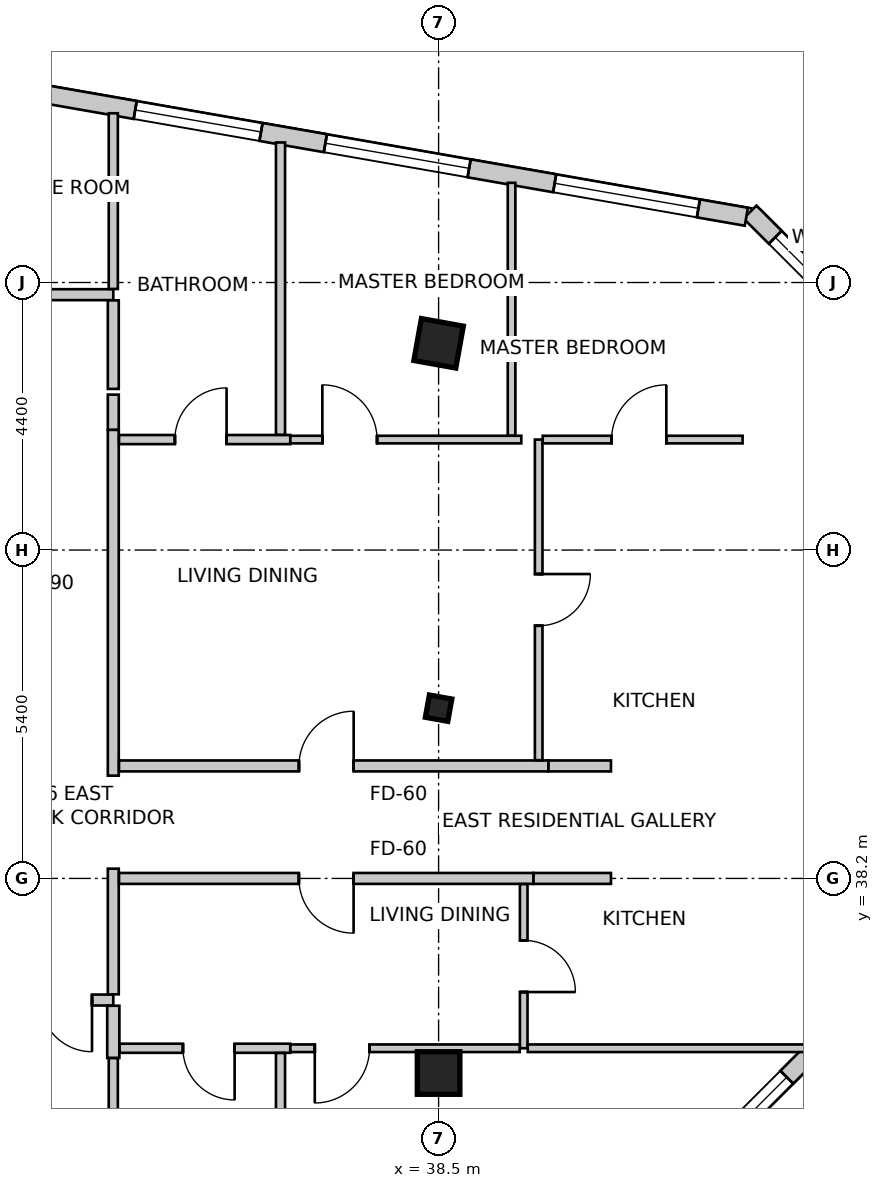
"""IFC4 building model, lengths in metres.
Left out: names, types, materials, properties, quantities, classifications, styles, units other than length and angle.
Written with IfcOpenShell. Run it as: python <this file> out.ifc"""

import sys

from ifc_helpers import new_model, si_unit, direction, frame, frame_2d, origin, origin_2d, place, context, subcontext, project, spatial, rectangle, i_section, extrude, source, transform, mapped, element, fill, save


model = new_model("IFC4")
c1 = context("Model", 3, precision=1e-05, world=origin(), true_north=direction((0.0, 1.0)))
c2 = subcontext(c1, "Body", "Model", "MODEL_VIEW")
j1 = project(units=[si_unit("LENGTHUNIT", "METRE"), si_unit("PLANEANGLEUNIT", "RADIAN")], contexts=[c1])
p1 = place(None, origin())
s1 = spatial("IfcSite", under=j1, at=p1, CompositionType="ELEMENT")
p2 = place(p1, origin())
s2 = spatial("IfcBuilding", under=s1, at=p2, CompositionType="ELEMENT")
p3 = place(p2, frame((0.0, 0.0, 221.9)))
s3 = spatial("IfcBuildingStorey", under=s2, at=p3, CompositionType="ELEMENT", Elevation=221.9)
m1 = source(origin(), c2, "Body", "SweptSolid", [
    extrude(rectangle(XDim=0.7, YDim=0.7, at=origin_2d()), origin(), (0.0, 0.0, 1.0), 3.5),
])
for number, where, z_axis, x_axis in (
    (1, (38.5, 47.0, 0.0), (0.0, 0.0, 1.0), (0.984, -0.177, 0.0)),
    (2, (38.5, 35.0, 0.0), (0.0, 0.0, 1.0), (1.0, 0.0, 0.0)),
):
    element("IfcColumn", number, at=place(p3, frame(where, z_axis=z_axis, x_axis=x_axis)), inside=s3, PredefinedType="COLUMN", context=c2, shape_type="MappedRepresentation", body=[
        mapped(m1, transform((0.0, 0.0, 0.0), scale=1.0)),
    ])
m2 = source(origin(), c2, "Body", "SweptSolid", [
    extrude(i_section(OverallWidth=0.374, OverallDepth=0.372, WebThickness=0.016, FlangeThickness=0.026, FilletRadius=0.015, at=origin_2d()), origin(), (0.0, 0.0, 1.0), 3.5),
])
p4 = place(p3, frame((38.5, 41.0, 0.0), z_axis=(0.0, 0.0, 1.0), x_axis=(0.984195607969, -0.17708474032, 0.0)))
e3 = element("IfcColumn", 3, at=p4, inside=s3, PredefinedType="COLUMN", context=c2, shape_type="MappedRepresentation", body=[
    mapped(m2, transform((0.0, 0.0, 0.0), scale=1.0)),
])
p5 = place(p3, frame((42.276, 32.98, 0.0), z_axis=(0.0, 0.0, 1.0), x_axis=(0.707106781187, 0.707106781187, 0.0)))
e4 = element("IfcWall", 4, at=p5, inside=s3, PredefinedType="SOLIDWALL", context=c2, shape_type="SweptSolid", body=[
    extrude(rectangle(XDim=4.922, YDim=0.3, at=frame_2d((2.461, 0.0))), origin(), (0.0, 0.0, 1.0), 3.25),
])
m3 = source(origin(), c2, "Body", "SweptSolid", [
    extrude(rectangle(XDim=2.1, YDim=2.0, at=frame_2d((1.05, 1.0))), frame((0.0, 0.16, 0.0), z_axis=(0.0, -1.0, 0.0), x_axis=(1.0, 0.0, 0.0)), (0.0, 0.0, 1.0), 0.32),
])
p6 = place(p5, frame((0.659, 0.0, 0.85)))
e5 = element("IfcOpeningElement", 5, at=p6, cuts=e4, PredefinedType="OPENING", context=c2, shape_type="MappedRepresentation", body=[
    mapped(m3, transform((0.0, 0.0, 0.0), scale=1.0)),
])
p7 = place(p3, frame((45.512, 47.268, 0.0), z_axis=(0.0, 0.0, 1.0), x_axis=(-0.707106781187, 0.707106781187, 0.0)))
e6 = element("IfcWall", 6, at=p7, inside=s3, PredefinedType="SOLIDWALL", context=c2, shape_type="SweptSolid", body=[
    extrude(rectangle(XDim=2.674, YDim=0.3, at=frame_2d((1.337, 0.0))), origin(), (0.0, 0.0, 1.0), 3.25),
])
m4 = source(origin(), c2, "Body", "SweptSolid", [
    extrude(rectangle(XDim=1.5, YDim=1.8, at=frame_2d((0.75, 0.9))), frame((0.0, 0.16, 0.0), z_axis=(0.0, -1.0, 0.0), x_axis=(1.0, 0.0, 0.0)), (0.0, 0.0, 1.0), 0.32),
])
p8 = place(p7, frame((0.587, 0.0, 0.85)))
e7 = element("IfcOpeningElement", 7, at=p8, cuts=e6, PredefinedType="OPENING", context=c2, shape_type="MappedRepresentation", body=[
    mapped(m4, transform((0.0, 0.0, 0.0), scale=1.0)),
])
p9 = place(p3, frame((43.561, 49.081, 0.0), z_axis=(0.0, 0.0, 1.0), x_axis=(-0.985083967494, 0.17207433564, 0.0)))
e8 = element("IfcWall", 8, at=p9, inside=s3, PredefinedType="SOLIDWALL", context=c2, shape_type="SweptSolid", body=[
    extrude(rectangle(XDim=22.006, YDim=0.3, at=frame_2d((11.003, 0.0))), origin(), (0.0, 0.0, 1.0), 3.25),
])
m5 = source(origin(), c2, "Body", "SweptSolid", [
    extrude(rectangle(XDim=2.4, YDim=2.2, at=frame_2d((1.2, 1.1))), frame((0.0, 0.16, 0.0), z_axis=(0.0, -1.0, 0.0), x_axis=(1.0, 0.0, 0.0)), (0.0, 0.0, 1.0), 0.32),
])
p10 = place(p9, frame((0.8, 0.0, 0.85)))
e9 = element("IfcOpeningElement", 9, at=p10, cuts=e8, PredefinedType="OPENING", context=c2, shape_type="MappedRepresentation", body=[
    mapped(m5, transform((0.0, 0.0, 0.0), scale=1.0)),
])
p11 = place(p9, frame((4.628, 0.0, 0.85)))
e10 = element("IfcOpeningElement", 10, at=p11, cuts=e8, PredefinedType="OPENING", context=c2, shape_type="MappedRepresentation", body=[
    mapped(m5, transform((0.0, 0.0, 0.0), scale=1.0)),
])
p12 = place(p9, frame((8.103, 0.0, 0.85)))
e11 = element("IfcOpeningElement", 11, at=p12, cuts=e8, PredefinedType="OPENING", context=c2, shape_type="MappedRepresentation", body=[
    mapped(m3, transform((0.0, 0.0, 0.0), scale=1.0)),
])
p13 = place(p9, frame((11.963, 0.0, 0.85)))
e12 = element("IfcOpeningElement", 12, at=p13, cuts=e8, PredefinedType="OPENING", context=c2, shape_type="MappedRepresentation", body=[
    mapped(m5, transform((0.0, 0.0, 0.0), scale=1.0)),
])
p14 = place(p9, frame((16.047, 0.0, 0.85)))
e13 = element("IfcOpeningElement", 13, at=p14, cuts=e8, PredefinedType="OPENING", context=c2, shape_type="MappedRepresentation", body=[
    mapped(m3, transform((0.0, 0.0, 0.0), scale=1.0)),
])
p15 = place(p9, frame((18.961, 0.0, 0.85)))
e14 = element("IfcOpeningElement", 14, at=p15, cuts=e8, PredefinedType="OPENING", context=c2, shape_type="MappedRepresentation", body=[
    mapped(m5, transform((0.0, 0.0, 0.0), scale=1.0)),
])
p16 = place(p3, frame((28.162, 47.8, 0.0), z_axis=(0.0, 0.0, 1.0), x_axis=(1.0, 0.0, 0.0)))
e15 = element("IfcWall", 15, at=p16, inside=s3, PredefinedType="PARTITIONING", context=c2, shape_type="SweptSolid", body=[
    extrude(rectangle(XDim=4.988, YDim=0.18, at=frame_2d((2.494, 0.0))), origin(), (0.0, 0.0, 1.0), 2.822),
])
m6 = source(origin(), c2, "Body", "SweptSolid", [
    extrude(rectangle(XDim=0.85, YDim=2.15, at=frame_2d((0.425, 1.075))), frame((0.0, 0.1, 0.0), z_axis=(0.0, -1.0, 0.0), x_axis=(1.0, 0.0, 0.0)), (0.0, 0.0, 1.0), 0.2),
])
p17 = place(p16, frame((0.403, 0.0, 0.0)))
e16 = element("IfcOpeningElement", 16, at=p17, cuts=e15, PredefinedType="OPENING", context=c2, shape_type="MappedRepresentation", body=[
    mapped(m6, transform((0.0, 0.0, 0.0), scale=1.0)),
])
p18 = place(p3, frame((33.15, 47.706, 0.0), z_axis=(0.0, 0.0, 1.0), x_axis=(0.0, -1.0, 0.0)))
e17 = element("IfcWall", 17, at=p18, inside=s3, PredefinedType="PARTITIONING", context=c2, shape_type="SweptSolid", body=[
    extrude(rectangle(XDim=1.456, YDim=0.18, at=frame_2d((0.728, 0.0))), origin(), (0.0, 0.0, 1.0), 2.934),
])
p19 = place(p3, frame((33.15, 36.2, 0.0), z_axis=(0.0, 0.0, 1.0), x_axis=(-1.0, 0.0, 0.0)))
e18 = element("IfcWall", 18, at=p19, inside=s3, PredefinedType="PARTITIONING", context=c2, shape_type="SweptSolid", body=[
    extrude(rectangle(XDim=1.48, YDim=0.18, at=frame_2d((0.74, 0.0))), origin(), (0.0, 0.0, 1.0), 3.25),
])
p20 = place(p19, frame((0.35, 0.0, 0.0)))
e19 = element("IfcOpeningElement", 19, at=p20, cuts=e18, PredefinedType="OPENING", context=c2, shape_type="MappedRepresentation", body=[
    mapped(m6, transform((0.0, 0.0, 0.0), scale=1.0)),
])
p21 = place(p3, frame((33.15, 45.577, 0.0), z_axis=(0.0, 0.0, 1.0), x_axis=(0.0, -1.0, 0.0)))
e20 = element("IfcWall", 20, at=p21, inside=s3, PredefinedType="PARTITIONING", context=c2, shape_type="SweptSolid", body=[
    extrude(rectangle(XDim=5.687, YDim=0.18, at=frame_2d((2.844, 0.0))), origin(), (0.0, 0.0, 1.0), 2.822),
])
p22 = place(p3, frame((33.15, 46.156, 0.0), z_axis=(0.0, 0.0, 1.0), x_axis=(0.0, -1.0, 0.0)))
e21 = element("IfcWall", 21, at=p22, inside=s3, PredefinedType="PARTITIONING", context=c2, shape_type="SweptSolid", body=[
    extrude(rectangle(XDim=0.577, YDim=0.18, at=frame_2d((0.289, 0.0))), origin(), (0.0, 0.0, 1.0), 2.822),
])
p23 = place(p3, frame((33.15, 38.36, 0.0), z_axis=(0.0, 0.0, 1.0), x_axis=(0.0, -1.0, 0.0)))
e22 = element("IfcWall", 22, at=p23, inside=s3, PredefinedType="PARTITIONING", context=c2, shape_type="SweptSolid", body=[
    extrude(rectangle(XDim=2.066, YDim=0.18, at=frame_2d((1.033, 0.0))), origin(), (0.0, 0.0, 1.0), 3.25),
])
p24 = place(p3, frame((33.15, 50.783, 0.0), z_axis=(0.0, 0.0, 1.0), x_axis=(0.0, -1.0, 0.0)))
e23 = element("IfcWall", 23, at=p24, inside=s3, PredefinedType="PARTITIONING", context=c2, shape_type="SweptSolid", body=[
    extrude(rectangle(XDim=2.889, YDim=0.15, at=frame_2d((1.445, 0.0))), origin(), (0.0, 0.0, 1.0), 2.542),
])
p25 = place(p3, frame((33.244, 40.05, 0.0), z_axis=(0.0, 0.0, 1.0), x_axis=(1.0, 0.0, 0.0)))
e24 = element("IfcWall", 24, at=p25, inside=s3, PredefinedType="PARTITIONING", context=c2, shape_type="SweptSolid", body=[
    extrude(rectangle(XDim=7.062, YDim=0.18, at=frame_2d((3.531, 0.0))), origin(), (0.0, 0.0, 1.0), 2.766),
])
m7 = source(origin(), c2, "Body", "SweptSolid", [
    extrude(rectangle(XDim=0.9, YDim=2.15, at=frame_2d((0.45, 1.075))), frame((0.0, 0.1, 0.0), z_axis=(0.0, -1.0, 0.0), x_axis=(1.0, 0.0, 0.0)), (0.0, 0.0, 1.0), 0.2),
])
p26 = place(p25, frame((2.959, 0.0, 0.0)))
e25 = element("IfcOpeningElement", 25, at=p26, cuts=e24, PredefinedType="OPENING", context=c2, shape_type="MappedRepresentation", body=[
    mapped(m7, transform((0.0, 0.0, 0.0), scale=1.0)),
])
p27 = place(p3, frame((40.308, 40.05, 0.0), z_axis=(0.0, 0.0, 1.0), x_axis=(1.0, 0.0, 0.0)))
e26 = element("IfcWall", 26, at=p27, inside=s3, PredefinedType="PARTITIONING", context=c2, shape_type="SweptSolid", body=[
    extrude(rectangle(XDim=1.027, YDim=0.18, at=frame_2d((0.513, 0.0))), origin(), (0.0, 0.0, 1.0), 3.25),
])
p28 = place(p3, frame((40.06, 38.2, 0.0), z_axis=(0.0, 0.0, 1.0), x_axis=(-1.0, 0.0, 0.0)))
e27 = element("IfcWall", 27, at=p28, inside=s3, PredefinedType="PARTITIONING", context=c2, shape_type="SweptSolid", body=[
    extrude(rectangle(XDim=6.816, YDim=0.18, at=frame_2d((3.408, 0.0))), origin(), (0.0, 0.0, 1.0), 2.766),
])
p29 = place(p28, frame((2.958, 0.0, 0.0)))
e28 = element("IfcOpeningElement", 28, at=p29, cuts=e27, PredefinedType="OPENING", context=c2, shape_type="MappedRepresentation", body=[
    mapped(m7, transform((0.0, 0.0, 0.0), scale=1.0)),
])
p30 = place(p3, frame((41.335, 38.2, 0.0), z_axis=(0.0, 0.0, 1.0), x_axis=(-1.0, 0.0, 0.0)))
e29 = element("IfcWall", 29, at=p30, inside=s3, PredefinedType="PARTITIONING", context=c2, shape_type="SweptSolid", body=[
    extrude(rectangle(XDim=1.273, YDim=0.18, at=frame_2d((0.636, 0.0))), origin(), (0.0, 0.0, 1.0), 3.25),
])
p31 = place(p3, frame((33.15, 36.106, 0.0), z_axis=(0.0, 0.0, 1.0), x_axis=(0.0, -1.0, 0.0)))
e30 = element("IfcWall", 30, at=p31, inside=s3, PredefinedType="PARTITIONING", context=c2, shape_type="SweptSolid", body=[
    extrude(rectangle(XDim=0.859, YDim=0.2, at=frame_2d((0.429, 0.0))), origin(), (0.0, 0.0, 1.0), 3.25),
])
p32 = place(p3, frame((33.15, 35.245, 0.0), z_axis=(0.0, 0.0, 1.0), x_axis=(0.0, -1.0, 0.0)))
e31 = element("IfcWall", 31, at=p32, inside=s3, PredefinedType="PARTITIONING", context=c2, shape_type="SweptSolid", body=[
    extrude(rectangle(XDim=2.288, YDim=0.15, at=frame_2d((1.144, 0.0))), origin(), (0.0, 0.0, 1.0), 3.25),
])
p33 = place(p3, frame((40.146, 45.417, 0.0), z_axis=(0.0, 0.0, 1.0), x_axis=(0.0, -1.0, 0.0)))
e32 = element("IfcWall", 32, at=p33, inside=s3, PredefinedType="PARTITIONING", context=c2, shape_type="SweptSolid", body=[
    extrude(rectangle(XDim=5.273, YDim=0.125, at=frame_2d((2.636, 0.0))), origin(), (0.0, 0.0, 1.0), 3.25),
])
m8 = source(origin(), c2, "Body", "SweptSolid", [
    extrude(rectangle(XDim=0.85, YDim=2.15, at=frame_2d((0.425, 1.075))), frame((0.0, 0.073, 0.0), z_axis=(0.0, -1.0, 0.0), x_axis=(1.0, 0.0, 0.0)), (0.0, 0.0, 1.0), 0.145),
])
p34 = place(p33, frame((2.211, 0.0, 0.0)))
e33 = element("IfcOpeningElement", 33, at=p34, cuts=e32, PredefinedType="OPENING", context=c2, shape_type="MappedRepresentation", body=[
    mapped(m8, transform((0.0, 0.0, 0.0), scale=1.0)),
])
p35 = place(p3, frame((33.244, 45.417, 0.0), z_axis=(0.0, 0.0, 1.0), x_axis=(1.0, 0.0, 0.0)))
e34 = element("IfcWall", 34, at=p35, inside=s3, PredefinedType="PARTITIONING", context=c2, shape_type="SweptSolid", body=[
    extrude(rectangle(XDim=2.816, YDim=0.15, at=frame_2d((1.408, 0.0))), origin(), (0.0, 0.0, 1.0), 2.934),
])
m9 = source(origin(), c2, "Body", "SweptSolid", [
    extrude(rectangle(XDim=0.85, YDim=2.15, at=frame_2d((0.425, 1.075))), frame((0.0, 0.085, 0.0), z_axis=(0.0, -1.0, 0.0), x_axis=(1.0, 0.0, 0.0)), (0.0, 0.0, 1.0), 0.17),
])
p36 = place(p35, frame((0.919, 0.0, 0.0)))
e35 = element("IfcOpeningElement", 35, at=p36, cuts=e34, PredefinedType="OPENING", context=c2, shape_type="MappedRepresentation", body=[
    mapped(m9, transform((0.0, 0.0, 0.0), scale=1.0)),
])
p37 = place(p3, frame((36.062, 45.417, 0.0), z_axis=(0.0, 0.0, 1.0), x_axis=(1.0, 0.0, 0.0)))
e36 = element("IfcWall", 36, at=p37, inside=s3, PredefinedType="PARTITIONING", context=c2, shape_type="SweptSolid", body=[
    extrude(rectangle(XDim=3.798, YDim=0.125, at=frame_2d((1.899, 0.0))), origin(), (0.0, 0.0, 1.0), 2.766),
])
m10 = source(origin(), c2, "Body", "SweptSolid", [
    extrude(rectangle(XDim=0.9, YDim=2.15, at=frame_2d((0.45, 1.075))), frame((0.0, 0.073, 0.0), z_axis=(0.0, -1.0, 0.0), x_axis=(1.0, 0.0, 0.0)), (0.0, 0.0, 1.0), 0.145),
])
p38 = place(p37, frame((0.526, 0.0, 0.0)))
e37 = element("IfcOpeningElement", 37, at=p38, cuts=e36, PredefinedType="OPENING", context=c2, shape_type="MappedRepresentation", body=[
    mapped(m10, transform((0.0, 0.0, 0.0), scale=1.0)),
])
p39 = place(p3, frame((40.212, 45.417, 0.0), z_axis=(0.0, 0.0, 1.0), x_axis=(1.0, 0.0, 0.0)))
e38 = element("IfcWall", 38, at=p39, inside=s3, PredefinedType="PARTITIONING", context=c2, shape_type="SweptSolid", body=[
    extrude(rectangle(XDim=3.288, YDim=0.125, at=frame_2d((1.644, 0.0))), origin(), (0.0, 0.0, 1.0), 3.25),
])
p40 = place(p39, frame((1.133, 0.0, 0.0)))
e39 = element("IfcOpeningElement", 39, at=p40, cuts=e38, PredefinedType="OPENING", context=c2, shape_type="MappedRepresentation", body=[
    mapped(m10, transform((0.0, 0.0, 0.0), scale=1.0)),
])
p41 = place(p3, frame((35.9, 50.303, 0.0), z_axis=(0.0, 0.0, 1.0), x_axis=(0.0, -1.0, 0.0)))
e40 = element("IfcWall", 40, at=p41, inside=s3, PredefinedType="PARTITIONING", context=c2, shape_type="SweptSolid", body=[
    extrude(rectangle(XDim=4.807, YDim=0.15, at=frame_2d((2.403, 0.0))), origin(), (0.0, 0.0, 1.0), 2.542),
])
p42 = place(p3, frame((39.7, 49.639, 0.0), z_axis=(0.0, 0.0, 1.0), x_axis=(0.0, -1.0, 0.0)))
e41 = element("IfcWall", 41, at=p42, inside=s3, PredefinedType="PARTITIONING", context=c2, shape_type="SweptSolid", body=[
    extrude(rectangle(XDim=4.156, YDim=0.125, at=frame_2d((2.078, 0.0))), origin(), (0.0, 0.0, 1.0), 3.25),
])
p43 = place(p3, frame((39.9, 38.106, 0.0), z_axis=(0.0, 0.0, 1.0), x_axis=(0.0, -1.0, 0.0)))
e42 = element("IfcWall", 42, at=p43, inside=s3, PredefinedType="PARTITIONING", context=c2, shape_type="SweptSolid", body=[
    extrude(rectangle(XDim=2.699, YDim=0.125, at=frame_2d((1.35, 0.0))), origin(), (0.0, 0.0, 1.0), 3.25),
])
p44 = place(p43, frame((0.925, 0.0, 0.0)))
e43 = element("IfcOpeningElement", 43, at=p44, cuts=e42, PredefinedType="OPENING", context=c2, shape_type="MappedRepresentation", body=[
    mapped(m8, transform((0.0, 0.0, 0.0), scale=1.0)),
])
p45 = place(p3, frame((36.06, 35.407, 0.0), z_axis=(0.0, 0.0, 1.0), x_axis=(-1.0, 0.0, 0.0)))
e44 = element("IfcWall", 44, at=p45, inside=s3, PredefinedType="PARTITIONING", context=c2, shape_type="SweptSolid", body=[
    extrude(rectangle(XDim=2.806, YDim=0.15, at=frame_2d((1.403, 0.0))), origin(), (0.0, 0.0, 1.0), 3.25),
])
p46 = place(p45, frame((0.915, 0.0, 0.0)))
e45 = element("IfcOpeningElement", 45, at=p46, cuts=e44, PredefinedType="OPENING", context=c2, shape_type="MappedRepresentation", body=[
    mapped(m9, transform((0.0, 0.0, 0.0), scale=1.0)),
])
p47 = place(p3, frame((39.833, 35.407, 0.0), z_axis=(0.0, 0.0, 1.0), x_axis=(-1.0, 0.0, 0.0)))
e46 = element("IfcWall", 46, at=p47, inside=s3, PredefinedType="PARTITIONING", context=c2, shape_type="SweptSolid", body=[
    extrude(rectangle(XDim=3.771, YDim=0.125, at=frame_2d((1.886, 0.0))), origin(), (0.0, 0.0, 1.0), 2.766),
])
p48 = place(p47, frame((2.47, 0.0, 0.0)))
e47 = element("IfcOpeningElement", 47, at=p48, cuts=e46, PredefinedType="OPENING", context=c2, shape_type="MappedRepresentation", body=[
    mapped(m10, transform((0.0, 0.0, 0.0), scale=1.0)),
])
p49 = place(p3, frame((44.54, 35.407, 0.0), z_axis=(0.0, 0.0, 1.0), x_axis=(-1.0, 0.0, 0.0)))
e48 = element("IfcWall", 48, at=p49, inside=s3, PredefinedType="PARTITIONING", context=c2, shape_type="SweptSolid", body=[
    extrude(rectangle(XDim=4.574, YDim=0.125, at=frame_2d((2.287, 0.0))), origin(), (0.0, 0.0, 1.0), 3.25),
])
p50 = place(p3, frame((35.9, 35.328, 0.0), z_axis=(0.0, 0.0, 1.0), x_axis=(0.0, -1.0, 0.0)))
e49 = element("IfcWall", 49, at=p50, inside=s3, PredefinedType="PARTITIONING", context=c2, shape_type="SweptSolid", body=[
    extrude(rectangle(XDim=2.371, YDim=0.15, at=frame_2d((1.186, 0.0))), origin(), (0.0, 0.0, 1.0), 3.25),
])
m11 = source(origin(), c2, "Body", "SweptSolid", [
    extrude(rectangle(XDim=2.1, YDim=2.0, at=frame_2d((1.05, 1.0))), frame((0.0, -0.015, 0.0), z_axis=(0.0, -1.0, 0.0), x_axis=(1.0, 0.0, 0.0)), (0.0, 0.0, 1.0), 0.06),
])
p51 = place(p6, origin())
e50 = element("IfcWindow", 50, at=p51, inside=s3, PartitioningType="SINGLE_PANEL", PredefinedType="WINDOW", context=c2, shape_type="MappedRepresentation", body=[
    mapped(m11, transform((0.0, 0.0, 0.0), scale=1.0)),
])
fill(e5, e50)
m12 = source(origin(), c2, "Body", "SweptSolid", [
    extrude(rectangle(XDim=1.5, YDim=1.8, at=frame_2d((0.75, 0.9))), frame((0.0, -0.015, 0.0), z_axis=(0.0, -1.0, 0.0), x_axis=(1.0, 0.0, 0.0)), (0.0, 0.0, 1.0), 0.06),
])
p52 = place(p8, origin())
e51 = element("IfcWindow", 51, at=p52, inside=s3, PartitioningType="SINGLE_PANEL", PredefinedType="WINDOW", context=c2, shape_type="MappedRepresentation", body=[
    mapped(m12, transform((0.0, 0.0, 0.0), scale=1.0)),
])
fill(e7, e51)
m13 = source(origin(), c2, "Body", "SweptSolid", [
    extrude(rectangle(XDim=2.4, YDim=2.2, at=frame_2d((1.2, 1.1))), frame((0.0, -0.015, 0.0), z_axis=(0.0, -1.0, 0.0), x_axis=(1.0, 0.0, 0.0)), (0.0, 0.0, 1.0), 0.06),
])
p53 = place(p10, origin())
e52 = element("IfcWindow", 52, at=p53, inside=s3, PartitioningType="SINGLE_PANEL", PredefinedType="WINDOW", context=c2, shape_type="MappedRepresentation", body=[
    mapped(m13, transform((0.0, 0.0, 0.0), scale=1.0)),
])
fill(e9, e52)
p54 = place(p11, origin())
e53 = element("IfcWindow", 53, at=p54, inside=s3, PartitioningType="SINGLE_PANEL", PredefinedType="WINDOW", context=c2, shape_type="MappedRepresentation", body=[
    mapped(m13, transform((0.0, 0.0, 0.0), scale=1.0)),
])
fill(e10, e53)
p55 = place(p12, origin())
e54 = element("IfcWindow", 54, at=p55, inside=s3, PartitioningType="SINGLE_PANEL", PredefinedType="WINDOW", context=c2, shape_type="MappedRepresentation", body=[
    mapped(m11, transform((0.0, 0.0, 0.0), scale=1.0)),
])
fill(e11, e54)
m14 = source(origin(), c2, "Body", "SweptSolid", [
    extrude(rectangle(XDim=0.85, YDim=2.15, at=frame_2d((0.425, 1.075))), frame((0.0, 0.025, 0.0), z_axis=(0.0, -1.0, 0.0), x_axis=(1.0, 0.0, 0.0)), (0.0, 0.0, 1.0), 0.05),
])
p56 = place(p20, origin())
e55 = element("IfcDoor", 55, at=p56, inside=s3, OperationType="SINGLE_SWING_LEFT", PredefinedType="DOOR", context=c2, shape_type="MappedRepresentation", body=[
    mapped(m14, transform((0.0, 0.0, 0.0), scale=1.0)),
])
fill(e19, e55)
m15 = source(origin(), c2, "Body", "SweptSolid", [
    extrude(rectangle(XDim=0.9, YDim=2.15, at=frame_2d((0.45, 1.075))), frame((0.0, 0.025, 0.0), z_axis=(0.0, -1.0, 0.0), x_axis=(1.0, 0.0, 0.0)), (0.0, 0.0, 1.0), 0.05),
])
p57 = place(p26, origin())
e56 = element("IfcDoor", 56, at=p57, inside=s3, OperationType="SINGLE_SWING_RIGHT", PredefinedType="DOOR", context=c2, shape_type="MappedRepresentation", body=[
    mapped(m15, transform((0.0, 0.0, 0.0), scale=1.0)),
])
fill(e25, e56)
p58 = place(p34, origin())
e57 = element("IfcDoor", 57, at=p58, inside=s3, OperationType="SINGLE_SWING_LEFT", PredefinedType="DOOR", context=c2, shape_type="MappedRepresentation", body=[
    mapped(m14, transform((0.0, 0.0, 0.0), scale=1.0)),
])
fill(e33, e57)
p59 = place(p36, origin())
e58 = element("IfcDoor", 58, at=p59, inside=s3, OperationType="SINGLE_SWING_RIGHT", PredefinedType="DOOR", context=c2, shape_type="MappedRepresentation", body=[
    mapped(m14, transform((0.0, 0.0, 0.0), scale=1.0)),
])
fill(e35, e58)
m16 = source(origin(), c2, "Body", "SweptSolid", [
    extrude(rectangle(XDim=0.9, YDim=2.15, at=frame_2d((0.45, 1.075))), frame((0.0, 0.025, 0.0), z_axis=(0.0, -1.0, 0.0), x_axis=(1.0, 0.0, 0.0)), (0.0, 0.0, 1.0), 0.05),
])
p60 = place(p38, origin())
e59 = element("IfcDoor", 59, at=p60, inside=s3, OperationType="SINGLE_SWING_LEFT", PredefinedType="DOOR", context=c2, shape_type="MappedRepresentation", body=[
    mapped(m16, transform((0.0, 0.0, 0.0), scale=1.0)),
])
fill(e37, e59)
p61 = place(p40, origin())
e60 = element("IfcDoor", 60, at=p61, inside=s3, OperationType="SINGLE_SWING_RIGHT", PredefinedType="DOOR", context=c2, shape_type="MappedRepresentation", body=[
    mapped(m16, transform((0.0, 0.0, 0.0), scale=1.0)),
])
fill(e39, e60)
p62 = place(p29, origin())
e61 = element("IfcDoor", 61, at=p62, inside=s3, OperationType="SINGLE_SWING_LEFT", PredefinedType="DOOR", context=c2, shape_type="MappedRepresentation", body=[
    mapped(m15, transform((0.0, 0.0, 0.0), scale=1.0)),
])
fill(e28, e61)
p63 = place(p44, origin())
e62 = element("IfcDoor", 62, at=p63, inside=s3, OperationType="SINGLE_SWING_RIGHT", PredefinedType="DOOR", context=c2, shape_type="MappedRepresentation", body=[
    mapped(m14, transform((0.0, 0.0, 0.0), scale=1.0)),
])
fill(e43, e62)
p64 = place(p46, origin())
e63 = element("IfcDoor", 63, at=p64, inside=s3, OperationType="SINGLE_SWING_LEFT", PredefinedType="DOOR", context=c2, shape_type="MappedRepresentation", body=[
    mapped(m14, transform((0.0, 0.0, 0.0), scale=1.0)),
])
fill(e45, e63)
p65 = place(p48, origin())
e64 = element("IfcDoor", 64, at=p65, inside=s3, OperationType="SINGLE_SWING_RIGHT", PredefinedType="DOOR", context=c2, shape_type="MappedRepresentation", body=[
    mapped(m16, transform((0.0, 0.0, 0.0), scale=1.0)),
])
fill(e47, e64)
save(model, sys.argv[1])
